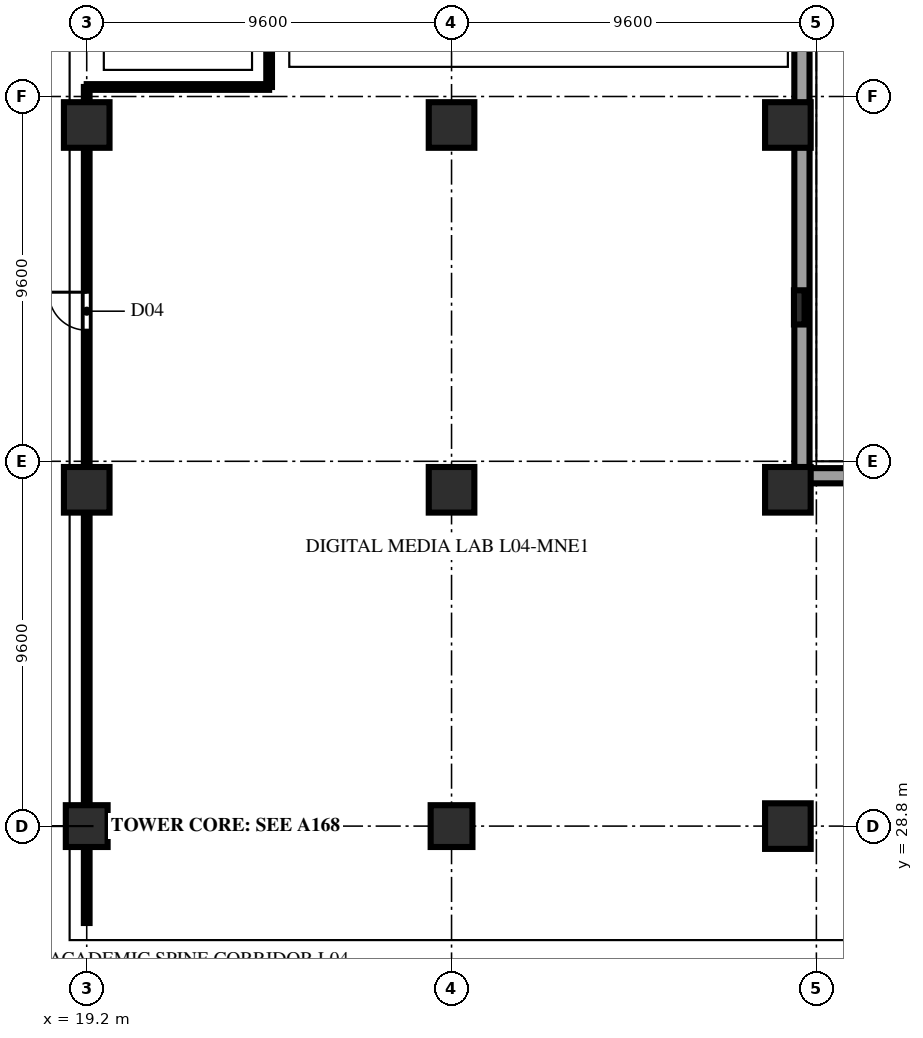
"""IFC4 building model, lengths in metres.
Left out: names, types, materials, properties, quantities, classifications, styles, units other than length and angle.
Written with IfcOpenShell. Run it as: python <this file> out.ifc"""

import sys

from ifc_helpers import new_model, si_unit, direction, frame, frame_2d, origin, origin_2d, place, context, subcontext, project, spatial, rectangle, extrude, element, fill, save


model = new_model("IFC4")
c1 = context("Model", 3, precision=1e-05, world=origin(), true_north=direction((0.0, 1.0)))
c2 = subcontext(c1, "Body", "Model", "MODEL_VIEW")
j1 = project(units=[si_unit("LENGTHUNIT", "METRE"), si_unit("PLANEANGLEUNIT", "RADIAN")], contexts=[c1])
p1 = place(None, origin())
s1 = spatial("IfcSite", under=j1, at=p1, CompositionType="ELEMENT")
p2 = place(p1, origin())
s2 = spatial("IfcBuilding", under=s1, at=p2, CompositionType="ELEMENT")
p3 = place(p2, frame((0.0, 0.0, 19.6)))
s3 = spatial("IfcBuildingStorey", under=s2, at=p3, CompositionType="ELEMENT", Elevation=19.6)
p4 = place(p3, frame((19.2, 28.8, 0.0), z_axis=(0.0, 0.0, 1.0), x_axis=(1.0, 0.0, 0.0)))
e1 = element("IfcColumn", 1, at=p4, inside=s3, PredefinedType="COLUMN", context=c2, shape_type="SweptSolid", body=[
    extrude(rectangle(XDim=1.1, YDim=1.1, at=origin_2d()), origin(), (0.0, 0.0, 1.0), 4.6),
])
for number, where, z_axis, x_axis in (
    (2, (19.2, 37.65, 0.0), (0.0, 0.0, 1.0), (1.0, 0.0, 0.0)),
    (3, (19.2, 47.25, 0.0), (0.0, 0.0, 1.0), (1.0, 0.0, 0.0)),
):
    element("IfcColumn", number, at=place(p3, frame(where, z_axis=z_axis, x_axis=x_axis)), inside=s3, PredefinedType="COLUMN", context=c2, shape_type="SweptSolid", body=[
        extrude(rectangle(XDim=1.2, YDim=1.2, at=origin_2d()), origin(), (0.0, 0.0, 1.0), 4.6),
    ])
p5 = place(p3, frame((28.8, 28.8, 0.0), z_axis=(0.0, 0.0, 1.0), x_axis=(1.0, 0.0, 0.0)))
e4 = element("IfcColumn", 4, at=p5, inside=s3, PredefinedType="COLUMN", context=c2, shape_type="SweptSolid", body=[
    extrude(rectangle(XDim=1.1, YDim=1.1, at=origin_2d()), origin(), (0.0, 0.0, 1.0), 4.6),
])
for number, where, z_axis, x_axis in (
    (5, (28.8, 37.65, 0.0), (0.0, 0.0, 1.0), (1.0, 0.0, 0.0)),
    (6, (28.8, 47.25, 0.0), (0.0, 0.0, 1.0), (1.0, 0.0, 0.0)),
    (7, (37.65, 28.8, 0.0), (0.0, 0.0, 1.0), (1.0, 0.0, 0.0)),
    (8, (37.65, 37.65, 0.0), (0.0, 0.0, 1.0), (1.0, 0.0, 0.0)),
    (9, (37.65, 47.25, 0.0), (0.0, 0.0, 1.0), (1.0, 0.0, 0.0)),
):
    element("IfcColumn", number, at=place(p3, frame(where, z_axis=z_axis, x_axis=x_axis)), inside=s3, PredefinedType="COLUMN", context=c2, shape_type="SweptSolid", body=[
        extrude(rectangle(XDim=1.2, YDim=1.2, at=origin_2d()), origin(), (0.0, 0.0, 1.0), 4.6),
    ])
p6 = place(p3, frame((37.95, 42.45, 0.0), z_axis=(0.0, 0.0, 1.0), x_axis=(0.0, 1.0, 0.0)))
e10 = element("IfcColumn", 10, at=p6, inside=s3, PredefinedType="PILASTER", context=c2, shape_type="SweptSolid", body=[
    extrude(rectangle(XDim=0.9, YDim=0.28, at=origin_2d()), origin(), (0.0, 0.0, 1.0), 4.6),
])
for number, where, z_axis, x_axis in (
    (11, (65.36, 38.02, 0.0), (0.0, 0.0, 1.0), (-1.0, 0.0, 0.0)),
    (12, (38.02, 37.68, 0.0), (0.0, 0.0, 1.0), (0.0, 1.0, 0.0)),
):
    element("IfcWall", number, at=place(p3, frame(where, z_axis=z_axis, x_axis=x_axis)), inside=s3, PredefinedType="SOLIDWALL", context=c2, shape_type="SweptSolid", body=[
        extrude(rectangle(XDim=27.68, YDim=0.4, at=frame_2d((13.84, 0.0))), origin(), (0.0, 0.0, 1.0), 4.34),
    ])
p7 = place(p3, frame((19.2, 26.25, 0.0), z_axis=(0.0, 0.0, 1.0), x_axis=(0.0, 1.0, 0.0)))
e13 = element("IfcWall", 13, at=p7, inside=s3, PredefinedType="PARTITIONING", context=c2, shape_type="SweptSolid", body=[
    extrude(rectangle(XDim=22.0, YDim=0.15, at=frame_2d((11.0, 0.0))), origin(), (0.0, 0.0, 1.0), 3.724),
])
p8 = place(p7, frame((15.6, 0.0, 0.0)))
e14 = element("IfcOpeningElement", 14, at=p8, cuts=e13, PredefinedType="OPENING", context=c2, shape_type="SweptSolid", body=[
    extrude(rectangle(XDim=1.0, YDim=2.2, at=frame_2d((0.5, 1.1))), frame((0.0, 0.087, 0.0), z_axis=(0.0, -1.0, 0.0), x_axis=(1.0, 0.0, 0.0)), (0.0, 0.0, 1.0), 0.174),
])
p9 = place(p3, frame((19.2, 48.25, 0.0), z_axis=(0.0, 0.0, 1.0), x_axis=(1.0, 0.0, 0.0)))
e15 = element("IfcWall", 15, at=p9, inside=s3, PredefinedType="PARTITIONING", context=c2, shape_type="SweptSolid", body=[
    extrude(rectangle(XDim=4.8, YDim=0.15, at=frame_2d((2.4, 0.0))), origin(), (0.0, 0.0, 1.0), 4.34),
])
p10 = place(p3, frame((24.0, 48.25, 0.0), z_axis=(0.0, 0.0, 1.0), x_axis=(0.0, 1.0, 0.0)))
e16 = element("IfcWall", 16, at=p10, inside=s3, PredefinedType="PARTITIONING", context=c2, shape_type="SweptSolid", body=[
    extrude(rectangle(XDim=8.438, YDim=0.15, at=frame_2d((4.219, 0.0))), origin(), (0.0, 0.0, 1.0), 3.796),
])
p11 = place(p10, frame((3.15, 0.0, 0.0)))
e17 = element("IfcOpeningElement", 17, at=p11, cuts=e16, PredefinedType="OPENING", context=c2, shape_type="SweptSolid", body=[
    extrude(rectangle(XDim=1.2, YDim=2.2, at=frame_2d((0.6, 1.1))), frame((0.0, 0.087, 0.0), z_axis=(0.0, -1.0, 0.0), x_axis=(1.0, 0.0, 0.0)), (0.0, 0.0, 1.0), 0.174),
])
p12 = place(p8, origin())
e18 = element("IfcDoor", 18, at=p12, inside=s3, OperationType="SINGLE_SWING_RIGHT", PredefinedType="DOOR", context=c2, shape_type="SweptSolid", body=[
    extrude(rectangle(XDim=1.0, YDim=2.2, at=frame_2d((0.5, 1.1))), frame((0.0, 0.025, 0.0), z_axis=(0.0, -1.0, 0.0), x_axis=(1.0, 0.0, 0.0)), (0.0, 0.0, 1.0), 0.05),
])
fill(e14, e18)
save(model, sys.argv[1])
